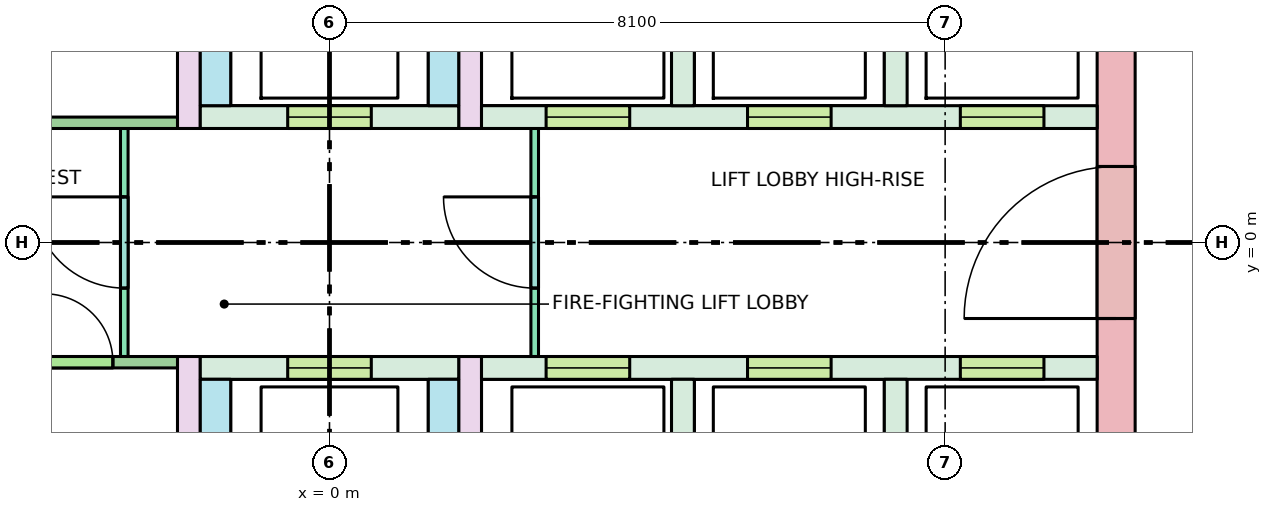
"""IFC4 building model, lengths in metres.
Left out: names, types, materials, properties, quantities, classifications, styles, units other than length and angle.
Written with IfcOpenShell. Run it as: python <this file> out.ifc"""

import sys

from ifc_helpers import new_model, si_unit, direction, frame, frame_2d, origin, place, context, subcontext, project, spatial, rectangle, extrude, element, fill, save


model = new_model("IFC4")
c1 = context("Model", 3, precision=1e-05, world=origin(), true_north=direction((0.0, 1.0)))
c2 = subcontext(c1, "Body", "Model", "MODEL_VIEW")
j1 = project(units=[si_unit("LENGTHUNIT", "METRE"), si_unit("PLANEANGLEUNIT", "RADIAN")], contexts=[c1])
p1 = place(None, origin())
s1 = spatial("IfcSite", under=j1, at=p1, CompositionType="ELEMENT")
p2 = place(p1, origin())
s2 = spatial("IfcBuilding", under=s1, at=p2, CompositionType="ELEMENT")
p3 = place(p2, frame((0.0, 0.0, 272.3)))
s3 = spatial("IfcBuildingStorey", under=s2, at=p3, CompositionType="ELEMENT", Elevation=272.3)
p4 = place(p3, frame((10.35, -5.13, -0.28), z_axis=(0.0, 0.0, 1.0), x_axis=(0.0, 1.0, 0.0)))
e1 = element("IfcWall", 1, at=p4, inside=s3, PredefinedType="SHEAR", context=c2, shape_type="SweptSolid", body=[
    extrude(rectangle(XDim=10.26, YDim=0.5, at=frame_2d((5.13, 0.0))), origin(), (0.0, 0.0, 1.0), 3.7),
])
p5 = place(p4, frame((4.13, 0.0, 0.28)))
e2 = element("IfcOpeningElement", 2, at=p5, cuts=e1, PredefinedType="OPENING", context=c2, shape_type="SweptSolid", body=[
    extrude(rectangle(XDim=2.0, YDim=2.1, at=frame_2d((1.0, 1.05))), frame((0.0, 0.26, 0.0), z_axis=(0.0, -1.0, 0.0), x_axis=(1.0, 0.0, 0.0)), (0.0, 0.0, 1.0), 0.52),
])
p6 = place(p3, frame((2.0, 1.65, 0.0), z_axis=(0.0, 0.0, 1.0), x_axis=(1.0, 0.0, 0.0)))
e3 = element("IfcWall", 3, at=p6, inside=s3, PredefinedType="SOLIDWALL", context=c2, shape_type="SweptSolid", body=[
    extrude(rectangle(XDim=8.1, YDim=0.3, at=frame_2d((4.05, 0.0))), origin(), (0.0, 0.0, 1.0), 3.42),
])
p7 = place(p6, frame((0.85, 0.0, 0.0)))
e4 = element("IfcOpeningElement", 4, at=p7, cuts=e3, PredefinedType="OPENING", context=c2, shape_type="SweptSolid", body=[
    extrude(rectangle(XDim=1.1, YDim=2.1, at=frame_2d((0.55, 1.05))), frame((0.0, 0.16, 0.0), z_axis=(0.0, -1.0, 0.0), x_axis=(1.0, 0.0, 0.0)), (0.0, 0.0, 1.0), 0.32),
])
p8 = place(p6, frame((3.5, 0.0, 0.0)))
e5 = element("IfcOpeningElement", 5, at=p8, cuts=e3, PredefinedType="OPENING", context=c2, shape_type="SweptSolid", body=[
    extrude(rectangle(XDim=1.1, YDim=2.1, at=frame_2d((0.55, 1.05))), frame((0.0, 0.16, 0.0), z_axis=(0.0, -1.0, 0.0), x_axis=(1.0, 0.0, 0.0)), (0.0, 0.0, 1.0), 0.32),
])
p9 = place(p6, frame((6.3, 0.0, 0.0)))
e6 = element("IfcOpeningElement", 6, at=p9, cuts=e3, PredefinedType="OPENING", context=c2, shape_type="SweptSolid", body=[
    extrude(rectangle(XDim=1.1, YDim=2.1, at=frame_2d((0.55, 1.05))), frame((0.0, 0.16, 0.0), z_axis=(0.0, -1.0, 0.0), x_axis=(1.0, 0.0, 0.0)), (0.0, 0.0, 1.0), 0.32),
])
p10 = place(p3, frame((2.0, -1.65, 0.0), z_axis=(0.0, 0.0, 1.0), x_axis=(1.0, 0.0, 0.0)))
e7 = element("IfcWall", 7, at=p10, inside=s3, PredefinedType="SOLIDWALL", context=c2, shape_type="SweptSolid", body=[
    extrude(rectangle(XDim=8.1, YDim=0.3, at=frame_2d((4.05, 0.0))), origin(), (0.0, 0.0, 1.0), 3.42),
])
p11 = place(p10, frame((0.85, 0.0, 0.0)))
e8 = element("IfcOpeningElement", 8, at=p11, cuts=e7, PredefinedType="OPENING", context=c2, shape_type="SweptSolid", body=[
    extrude(rectangle(XDim=1.1, YDim=2.1, at=frame_2d((0.55, 1.05))), frame((0.0, 0.16, 0.0), z_axis=(0.0, -1.0, 0.0), x_axis=(1.0, 0.0, 0.0)), (0.0, 0.0, 1.0), 0.32),
])
p12 = place(p10, frame((3.5, 0.0, 0.0)))
e9 = element("IfcOpeningElement", 9, at=p12, cuts=e7, PredefinedType="OPENING", context=c2, shape_type="SweptSolid", body=[
    extrude(rectangle(XDim=1.1, YDim=2.1, at=frame_2d((0.55, 1.05))), frame((0.0, 0.16, 0.0), z_axis=(0.0, -1.0, 0.0), x_axis=(1.0, 0.0, 0.0)), (0.0, 0.0, 1.0), 0.32),
])
p13 = place(p10, frame((6.3, 0.0, 0.0)))
e10 = element("IfcOpeningElement", 10, at=p13, cuts=e7, PredefinedType="OPENING", context=c2, shape_type="SweptSolid", body=[
    extrude(rectangle(XDim=1.1, YDim=2.1, at=frame_2d((0.55, 1.05))), frame((0.0, 0.16, 0.0), z_axis=(0.0, -1.0, 0.0), x_axis=(1.0, 0.0, 0.0)), (0.0, 0.0, 1.0), 0.32),
])
for number, where, z_axis, x_axis in (
    (11, (4.65, 1.8, 0.0), (0.0, 0.0, 1.0), (0.0, 1.0, 0.0)),
    (12, (4.65, -4.2, 0.0), (0.0, 0.0, 1.0), (0.0, 1.0, 0.0)),
    (13, (7.45, 1.8, 0.0), (0.0, 0.0, 1.0), (0.0, 1.0, 0.0)),
    (14, (7.45, -4.2, 0.0), (0.0, 0.0, 1.0), (0.0, 1.0, 0.0)),
):
    element("IfcWall", number, at=place(p3, frame(where, z_axis=z_axis, x_axis=x_axis)), inside=s3, PredefinedType="SOLIDWALL", context=c2, shape_type="SweptSolid", body=[
        extrude(rectangle(XDim=2.4, YDim=0.3, at=frame_2d((1.2, 0.0))), origin(), (0.0, 0.0, 1.0), 3.42),
    ])
for number, where, z_axis, x_axis in (
    (15, (-1.85, 1.5, 0.0), (0.0, 0.0, 1.0), (0.0, 1.0, 0.0)),
    (16, (-1.85, -8.1, 0.0), (0.0, 0.0, 1.0), (0.0, 1.0, 0.0)),
    (17, (1.85, 1.5, 0.0), (0.0, 0.0, 1.0), (0.0, 1.0, 0.0)),
    (18, (1.85, -8.1, 0.0), (0.0, 0.0, 1.0), (0.0, 1.0, 0.0)),
):
    element("IfcWall", number, at=place(p3, frame(where, z_axis=z_axis, x_axis=x_axis)), inside=s3, PredefinedType="SHEAR", context=c2, shape_type="SweptSolid", body=[
        extrude(rectangle(XDim=6.6, YDim=0.3, at=frame_2d((3.3, 0.0))), origin(), (0.0, 0.0, 1.0), 3.42),
    ])
p14 = place(p3, frame((-1.7, 1.65, 0.0), z_axis=(0.0, 0.0, 1.0), x_axis=(1.0, 0.0, 0.0)))
e19 = element("IfcWall", 19, at=p14, inside=s3, PredefinedType="SOLIDWALL", context=c2, shape_type="SweptSolid", body=[
    extrude(rectangle(XDim=3.4, YDim=0.3, at=frame_2d((1.7, 0.0))), origin(), (0.0, 0.0, 1.0), 3.42),
])
p15 = place(p14, frame((1.15, 0.0, 0.0)))
e20 = element("IfcOpeningElement", 20, at=p15, cuts=e19, PredefinedType="OPENING", context=c2, shape_type="SweptSolid", body=[
    extrude(rectangle(XDim=1.1, YDim=2.1, at=frame_2d((0.55, 1.05))), frame((0.0, 0.16, 0.0), z_axis=(0.0, -1.0, 0.0), x_axis=(1.0, 0.0, 0.0)), (0.0, 0.0, 1.0), 0.32),
])
p16 = place(p3, frame((-1.7, -1.65, 0.0), z_axis=(0.0, 0.0, 1.0), x_axis=(1.0, 0.0, 0.0)))
e21 = element("IfcWall", 21, at=p16, inside=s3, PredefinedType="SOLIDWALL", context=c2, shape_type="SweptSolid", body=[
    extrude(rectangle(XDim=3.4, YDim=0.3, at=frame_2d((1.7, 0.0))), origin(), (0.0, 0.0, 1.0), 3.42),
])
p17 = place(p16, frame((1.15, 0.0, 0.0)))
e22 = element("IfcOpeningElement", 22, at=p17, cuts=e21, PredefinedType="OPENING", context=c2, shape_type="SweptSolid", body=[
    extrude(rectangle(XDim=1.1, YDim=2.1, at=frame_2d((0.55, 1.05))), frame((0.0, 0.16, 0.0), z_axis=(0.0, -1.0, 0.0), x_axis=(1.0, 0.0, 0.0)), (0.0, 0.0, 1.0), 0.32),
])
for number, where, z_axis, x_axis in (
    (23, (-1.5, 1.8, 0.0), (0.0, 0.0, 1.0), (0.0, 1.0, 0.0)),
    (24, (-1.5, -4.8, 0.0), (0.0, 0.0, 1.0), (0.0, 1.0, 0.0)),
    (25, (1.5, 1.8, 0.0), (0.0, 0.0, 1.0), (0.0, 1.0, 0.0)),
    (26, (1.5, -4.8, 0.0), (0.0, 0.0, 1.0), (0.0, 1.0, 0.0)),
):
    element("IfcWall", number, at=place(p3, frame(where, z_axis=z_axis, x_axis=x_axis)), inside=s3, PredefinedType="SOLIDWALL", context=c2, shape_type="SweptSolid", body=[
        extrude(rectangle(XDim=3.0, YDim=0.4, at=frame_2d((1.5, 0.0))), origin(), (0.0, 0.0, 1.0), 3.42),
    ])
p18 = place(p3, frame((-2.7, -1.5, 0.0), z_axis=(0.0, 0.0, 1.0), x_axis=(0.0, 1.0, 0.0)))
e27 = element("IfcWall", 27, at=p18, inside=s3, PredefinedType="PARTITIONING", context=c2, shape_type="SweptSolid", body=[
    extrude(rectangle(XDim=3.0, YDim=0.1, at=frame_2d((1.5, 0.0))), origin(), (0.0, 0.0, 1.0), 3.42),
])
p19 = place(p18, frame((0.9, 0.0, 0.0)))
e28 = element("IfcOpeningElement", 28, at=p19, cuts=e27, PredefinedType="OPENING", context=c2, shape_type="SweptSolid", body=[
    extrude(rectangle(XDim=1.2, YDim=2.1, at=frame_2d((0.6, 1.05))), frame((0.0, 0.06, 0.0), z_axis=(0.0, -1.0, 0.0), x_axis=(1.0, 0.0, 0.0)), (0.0, 0.0, 1.0), 0.12),
])
p20 = place(p3, frame((2.7, -1.5, 0.0), z_axis=(0.0, 0.0, 1.0), x_axis=(0.0, 1.0, 0.0)))
e29 = element("IfcWall", 29, at=p20, inside=s3, PredefinedType="PARTITIONING", context=c2, shape_type="SweptSolid", body=[
    extrude(rectangle(XDim=3.0, YDim=0.1, at=frame_2d((1.5, 0.0))), origin(), (0.0, 0.0, 1.0), 3.42),
])
p21 = place(p20, frame((0.9, 0.0, 0.0)))
e30 = element("IfcOpeningElement", 30, at=p21, cuts=e29, PredefinedType="OPENING", context=c2, shape_type="SweptSolid", body=[
    extrude(rectangle(XDim=1.2, YDim=2.1, at=frame_2d((0.6, 1.05))), frame((0.0, 0.06, 0.0), z_axis=(0.0, -1.0, 0.0), x_axis=(1.0, 0.0, 0.0)), (0.0, 0.0, 1.0), 0.12),
])
p22 = place(p3, frame((-10.1, 1.575, 0.0), z_axis=(0.0, 0.0, 1.0), x_axis=(1.0, 0.0, 0.0)))
e31 = element("IfcWall", 31, at=p22, inside=s3, PredefinedType="PARTITIONING", context=c2, shape_type="SweptSolid", body=[
    extrude(rectangle(XDim=8.1, YDim=0.15, at=frame_2d((4.05, 0.0))), origin(), (0.0, 0.0, 1.0), 3.42),
])
p23 = place(p22, frame((0.941, 0.0, 0.0)))
e32 = element("IfcOpeningElement", 32, at=p23, cuts=e31, PredefinedType="OPENING", context=c2, shape_type="SweptSolid", body=[
    extrude(rectangle(XDim=0.9, YDim=2.1, at=frame_2d((0.45, 1.05))), frame((0.0, 0.085, 0.0), z_axis=(0.0, -1.0, 0.0), x_axis=(1.0, 0.0, 0.0)), (0.0, 0.0, 1.0), 0.17),
])
p24 = place(p22, frame((5.066, 0.0, 0.0)))
e33 = element("IfcOpeningElement", 33, at=p24, cuts=e31, PredefinedType="OPENING", context=c2, shape_type="SweptSolid", body=[
    extrude(rectangle(XDim=0.9, YDim=2.1, at=frame_2d((0.45, 1.05))), frame((0.0, 0.085, 0.0), z_axis=(0.0, -1.0, 0.0), x_axis=(1.0, 0.0, 0.0)), (0.0, 0.0, 1.0), 0.17),
])
p25 = place(p3, frame((-10.1, -1.575, 0.0), z_axis=(0.0, 0.0, 1.0), x_axis=(1.0, 0.0, 0.0)))
e34 = element("IfcWall", 34, at=p25, inside=s3, PredefinedType="PARTITIONING", context=c2, shape_type="SweptSolid", body=[
    extrude(rectangle(XDim=8.1, YDim=0.15, at=frame_2d((4.05, 0.0))), origin(), (0.0, 0.0, 1.0), 3.42),
])
p26 = place(p25, frame((2.333, 0.0, 0.0)))
e35 = element("IfcOpeningElement", 35, at=p26, cuts=e34, PredefinedType="OPENING", context=c2, shape_type="SweptSolid", body=[
    extrude(rectangle(XDim=0.9, YDim=2.1, at=frame_2d((0.45, 1.05))), frame((0.0, 0.085, 0.0), z_axis=(0.0, -1.0, 0.0), x_axis=(1.0, 0.0, 0.0)), (0.0, 0.0, 1.0), 0.17),
])
p27 = place(p25, frame((6.35, 0.0, 0.0)))
e36 = element("IfcOpeningElement", 36, at=p27, cuts=e34, PredefinedType="OPENING", context=c2, shape_type="SweptSolid", body=[
    extrude(rectangle(XDim=0.9, YDim=2.1, at=frame_2d((0.45, 1.05))), frame((0.0, 0.085, 0.0), z_axis=(0.0, -1.0, 0.0), x_axis=(1.0, 0.0, 0.0)), (0.0, 0.0, 1.0), 0.17),
])
p28 = place(p7, origin())
e37 = element("IfcDoor", 37, at=p28, inside=s3, OperationType="DOUBLE_DOOR_SLIDING", PredefinedType="DOOR", context=c2, shape_type="SweptSolid", body=[
    extrude(rectangle(XDim=1.1, YDim=2.1, at=frame_2d((0.55, 1.05))), frame((0.0, 0.025, 0.0), z_axis=(0.0, -1.0, 0.0), x_axis=(1.0, 0.0, 0.0)), (0.0, 0.0, 1.0), 0.05),
])
fill(e4, e37)
p29 = place(p8, origin())
e38 = element("IfcDoor", 38, at=p29, inside=s3, OperationType="DOUBLE_DOOR_SLIDING", PredefinedType="DOOR", context=c2, shape_type="SweptSolid", body=[
    extrude(rectangle(XDim=1.1, YDim=2.1, at=frame_2d((0.55, 1.05))), frame((0.0, 0.025, 0.0), z_axis=(0.0, -1.0, 0.0), x_axis=(1.0, 0.0, 0.0)), (0.0, 0.0, 1.0), 0.05),
])
fill(e5, e38)
p30 = place(p9, origin())
e39 = element("IfcDoor", 39, at=p30, inside=s3, OperationType="DOUBLE_DOOR_SLIDING", PredefinedType="DOOR", context=c2, shape_type="SweptSolid", body=[
    extrude(rectangle(XDim=1.1, YDim=2.1, at=frame_2d((0.55, 1.05))), frame((0.0, 0.025, 0.0), z_axis=(0.0, -1.0, 0.0), x_axis=(1.0, 0.0, 0.0)), (0.0, 0.0, 1.0), 0.05),
])
fill(e6, e39)
p31 = place(p11, origin())
e40 = element("IfcDoor", 40, at=p31, inside=s3, OperationType="DOUBLE_DOOR_SLIDING", PredefinedType="DOOR", context=c2, shape_type="SweptSolid", body=[
    extrude(rectangle(XDim=1.1, YDim=2.1, at=frame_2d((0.55, 1.05))), frame((0.0, 0.025, 0.0), z_axis=(0.0, -1.0, 0.0), x_axis=(1.0, 0.0, 0.0)), (0.0, 0.0, 1.0), 0.05),
])
fill(e8, e40)
p32 = place(p12, origin())
e41 = element("IfcDoor", 41, at=p32, inside=s3, OperationType="DOUBLE_DOOR_SLIDING", PredefinedType="DOOR", context=c2, shape_type="SweptSolid", body=[
    extrude(rectangle(XDim=1.1, YDim=2.1, at=frame_2d((0.55, 1.05))), frame((0.0, 0.025, 0.0), z_axis=(0.0, -1.0, 0.0), x_axis=(1.0, 0.0, 0.0)), (0.0, 0.0, 1.0), 0.05),
])
fill(e9, e41)
p33 = place(p13, origin())
e42 = element("IfcDoor", 42, at=p33, inside=s3, OperationType="DOUBLE_DOOR_SLIDING", PredefinedType="DOOR", context=c2, shape_type="SweptSolid", body=[
    extrude(rectangle(XDim=1.1, YDim=2.1, at=frame_2d((0.55, 1.05))), frame((0.0, 0.025, 0.0), z_axis=(0.0, -1.0, 0.0), x_axis=(1.0, 0.0, 0.0)), (0.0, 0.0, 1.0), 0.05),
])
fill(e10, e42)
p34 = place(p15, origin())
e43 = element("IfcDoor", 43, at=p34, inside=s3, OperationType="DOUBLE_DOOR_SLIDING", PredefinedType="DOOR", context=c2, shape_type="SweptSolid", body=[
    extrude(rectangle(XDim=1.1, YDim=2.1, at=frame_2d((0.55, 1.05))), frame((0.0, 0.025, 0.0), z_axis=(0.0, -1.0, 0.0), x_axis=(1.0, 0.0, 0.0)), (0.0, 0.0, 1.0), 0.05),
])
fill(e20, e43)
p35 = place(p17, origin())
e44 = element("IfcDoor", 44, at=p35, inside=s3, OperationType="DOUBLE_DOOR_SLIDING", PredefinedType="DOOR", context=c2, shape_type="SweptSolid", body=[
    extrude(rectangle(XDim=1.1, YDim=2.1, at=frame_2d((0.55, 1.05))), frame((0.0, 0.025, 0.0), z_axis=(0.0, -1.0, 0.0), x_axis=(1.0, 0.0, 0.0)), (0.0, 0.0, 1.0), 0.05),
])
fill(e22, e44)
p36 = place(p5, origin())
e45 = element("IfcDoor", 45, at=p36, inside=s3, OperationType="DOUBLE_DOOR_SINGLE_SWING", PredefinedType="DOOR", context=c2, shape_type="SweptSolid", body=[
    extrude(rectangle(XDim=2.0, YDim=2.1, at=frame_2d((1.0, 1.05))), frame((0.0, 0.025, 0.0), z_axis=(0.0, -1.0, 0.0), x_axis=(1.0, 0.0, 0.0)), (0.0, 0.0, 1.0), 0.05),
])
fill(e2, e45)
p37 = place(p19, origin())
e46 = element("IfcDoor", 46, at=p37, inside=s3, OperationType="SINGLE_SWING_RIGHT", PredefinedType="DOOR", context=c2, shape_type="SweptSolid", body=[
    extrude(rectangle(XDim=1.2, YDim=2.1, at=frame_2d((0.6, 1.05))), frame((0.0, 0.025, 0.0), z_axis=(0.0, -1.0, 0.0), x_axis=(1.0, 0.0, 0.0)), (0.0, 0.0, 1.0), 0.05),
])
fill(e28, e46)
p38 = place(p21, origin())
e47 = element("IfcDoor", 47, at=p38, inside=s3, OperationType="SINGLE_SWING_RIGHT", PredefinedType="DOOR", context=c2, shape_type="SweptSolid", body=[
    extrude(rectangle(XDim=1.2, YDim=2.1, at=frame_2d((0.6, 1.05))), frame((0.0, 0.025, 0.0), z_axis=(0.0, -1.0, 0.0), x_axis=(1.0, 0.0, 0.0)), (0.0, 0.0, 1.0), 0.05),
])
fill(e30, e47)
p39 = place(p27, origin())
e48 = element("IfcDoor", 48, at=p39, inside=s3, OperationType="SINGLE_SWING_LEFT", PredefinedType="DOOR", context=c2, shape_type="SweptSolid", body=[
    extrude(rectangle(XDim=0.9, YDim=2.1, at=frame_2d((0.45, 1.05))), frame((0.0, 0.025, 0.0), z_axis=(0.0, -1.0, 0.0), x_axis=(1.0, 0.0, 0.0)), (0.0, 0.0, 1.0), 0.05),
])
fill(e36, e48)
save(model, sys.argv[1])
